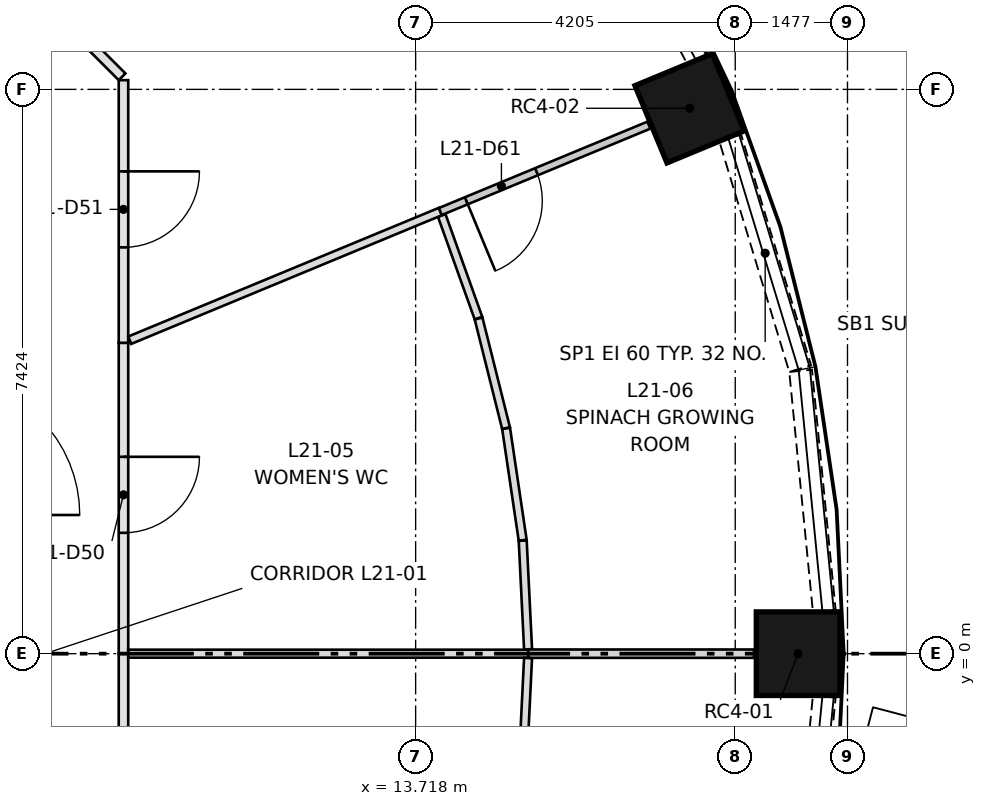
"""IFC4 building model, lengths in metres.
Left out: names, types, materials, properties, quantities, classifications, styles, units other than length and angle.
Written with IfcOpenShell. Run it as: python <this file> out.ifc"""

import sys

from ifc_helpers import new_model, si_unit, direction, frame, frame_2d, origin, origin_2d, place, context, subcontext, project, spatial, rectangle, extrude, element, fill, save


model = new_model("IFC4")
c1 = context("Model", 3, precision=1e-05, world=origin(), true_north=direction((0.0, 1.0)))
c2 = subcontext(c1, "Body", "Model", "MODEL_VIEW")
j1 = project(units=[si_unit("LENGTHUNIT", "METRE"), si_unit("PLANEANGLEUNIT", "RADIAN")], contexts=[c1])
p1 = place(None, origin())
s1 = spatial("IfcSite", under=j1, at=p1, CompositionType="ELEMENT")
p2 = place(p1, origin())
s2 = spatial("IfcBuilding", under=s1, at=p2, CompositionType="ELEMENT")
p3 = place(p2, frame((0.0, 0.0, 83.7)))
s3 = spatial("IfcBuildingStorey", under=s2, at=p3, CompositionType="ELEMENT", Elevation=83.7)
for number, where, z_axis, x_axis in (
    (1, (18.75, 0.0, 0.0), (0.0, 0.0, 1.0), (1.0, 0.0, 0.0)),
    (2, (17.323, 7.175, 0.0), (0.0, 0.0, 1.0), (0.924, 0.383, 0.0)),
):
    element("IfcColumn", number, at=place(p3, frame(where, z_axis=z_axis, x_axis=x_axis)), inside=s3, PredefinedType="COLUMN", context=c2, shape_type="SweptSolid", body=[
        extrude(rectangle(XDim=1.1, YDim=1.1, at=origin_2d()), origin(), (0.0, 0.0, 1.0), 3.65),
    ])
p4 = place(p3, frame((19.094, 0.564, 0.0), z_axis=(0.0, 0.0, 1.0), x_axis=(-0.098040704044, 0.995182405567, 0.0)))
e3 = element("IfcWall", 3, at=p4, inside=s3, PredefinedType="SOLIDWALL", context=c2, shape_type="SweptSolid", body=[
    extrude(rectangle(XDim=3.173, YDim=0.3, at=frame_2d((1.586, 0.0))), origin(), (0.0, 0.0, 1.0), 0.9),
])
p5 = place(p3, frame((18.778, 3.75, 0.0), z_axis=(0.0, 0.0, 1.0), x_axis=(-0.290325591482, 0.956927923582, 0.0)))
e4 = element("IfcWall", 4, at=p5, inside=s3, PredefinedType="SOLIDWALL", context=c2, shape_type="SweptSolid", body=[
    extrude(rectangle(XDim=3.173, YDim=0.3, at=frame_2d((1.586, 0.0))), origin(), (0.0, 0.0, 1.0), 0.9),
])
p6 = place(p3, frame((17.425, 7.828, 0.0), z_axis=(0.0, 0.0, 1.0), x_axis=(-0.471458802606, 0.88188808669, 0.0)))
e5 = element("IfcWall", 5, at=p6, inside=s3, PredefinedType="SOLIDWALL", context=c2, shape_type="SweptSolid", body=[
    extrude(rectangle(XDim=3.172, YDim=0.3, at=frame_2d((1.586, 0.0))), origin(), (0.0, 0.0, 1.0), 0.9),
])
p7 = place(p3, frame((18.783, -3.721, 0.0), z_axis=(0.0, 0.0, 1.0), x_axis=(0.098040704044, 0.995182405567, 0.0)))
e6 = element("IfcWall", 6, at=p7, inside=s3, PredefinedType="SOLIDWALL", context=c2, shape_type="SweptSolid", body=[
    extrude(rectangle(XDim=3.173, YDim=0.3, at=frame_2d((1.586, 0.0))), origin(), (0.0, 0.0, 1.0), 0.9),
])
p8 = place(p3, frame((9.874, 4.09, 0.0), z_axis=(0.0, 0.0, 1.0), x_axis=(0.0, -1.0, 0.0)))
e7 = element("IfcWall", 7, at=p8, inside=s3, PredefinedType="PARTITIONING", context=c2, shape_type="SweptSolid", body=[
    extrude(rectangle(XDim=4.09, YDim=0.125, at=frame_2d((2.045, 0.0))), origin(), (0.0, 0.0, 1.0), 3.3),
])
p9 = place(p8, frame((1.5, 0.0, 0.0)))
e8 = element("IfcOpeningElement", 8, at=p9, cuts=e7, PredefinedType="OPENING", context=c2, shape_type="SweptSolid", body=[
    extrude(rectangle(XDim=1.0, YDim=2.1, at=frame_2d((0.5, 1.05))), frame((0.0, 0.073, 0.0), z_axis=(0.0, -1.0, 0.0), x_axis=(1.0, 0.0, 0.0)), (0.0, 0.0, 1.0), 0.145),
])
p10 = place(p3, frame((8.722, 8.722, 0.0), z_axis=(0.0, 0.0, 1.0), x_axis=(0.70718294931, -0.707030604857, 0.0)))
e9 = element("IfcWall", 9, at=p10, inside=s3, PredefinedType="PARTITIONING", context=c2, shape_type="SweptSolid", body=[
    extrude(rectangle(XDim=1.603, YDim=0.125, at=frame_2d((0.801, 0.0))), origin(), (0.0, 0.0, 1.0), 3.3),
])
p11 = place(p3, frame((9.874, 7.545, 0.0), z_axis=(0.0, 0.0, 1.0), x_axis=(0.0, -1.0, 0.0)))
e10 = element("IfcWall", 10, at=p11, inside=s3, PredefinedType="PARTITIONING", context=c2, shape_type="SweptSolid", body=[
    extrude(rectangle(XDim=3.455, YDim=0.125, at=frame_2d((1.728, 0.0))), origin(), (0.0, 0.0, 1.0), 3.3),
])
p12 = place(p11, frame((1.2, 0.0, 0.0)))
e11 = element("IfcOpeningElement", 11, at=p12, cuts=e10, PredefinedType="OPENING", context=c2, shape_type="SweptSolid", body=[
    extrude(rectangle(XDim=1.0, YDim=2.1, at=frame_2d((0.5, 1.05))), frame((0.0, 0.073, 0.0), z_axis=(0.0, -1.0, 0.0), x_axis=(1.0, 0.0, 0.0)), (0.0, 0.0, 1.0), 0.145),
])
p13 = place(p3, frame((9.874, 0.0, 0.0), z_axis=(0.0, 0.0, 1.0), x_axis=(0.0, -1.0, 0.0)))
e12 = element("IfcWall", 12, at=p13, inside=s3, PredefinedType="PARTITIONING", context=c2, shape_type="SweptSolid", body=[
    extrude(rectangle(XDim=4.09, YDim=0.125, at=frame_2d((2.045, 0.0))), origin(), (0.0, 0.0, 1.0), 3.3),
])
p14 = place(p13, frame((1.5, 0.0, 0.0)))
e13 = element("IfcOpeningElement", 13, at=p14, cuts=e12, PredefinedType="OPENING", context=c2, shape_type="SweptSolid", body=[
    extrude(rectangle(XDim=1.0, YDim=2.1, at=frame_2d((0.5, 1.05))), frame((0.0, 0.073, 0.0), z_axis=(0.0, -1.0, 0.0), x_axis=(1.0, 0.0, 0.0)), (0.0, 0.0, 1.0), 0.145),
])
p15 = place(p3, frame((14.062, 5.765, 0.0), z_axis=(0.0, 0.0, 1.0), x_axis=(0.336940319535, -0.941526006583, 0.0)))
e14 = element("IfcWall", 14, at=p15, inside=s3, PredefinedType="PARTITIONING", context=c2, shape_type="SweptSolid", body=[
    extrude(rectangle(XDim=1.434, YDim=0.105, at=frame_2d((0.717, 0.0))), origin(), (0.0, 0.0, 1.0), 3.3),
])
p16 = place(p3, frame((14.546, 4.41, 0.0), z_axis=(0.0, 0.0, 1.0), x_axis=(0.242922070527, -0.970045806986, 0.0)))
e15 = element("IfcWall", 15, at=p16, inside=s3, PredefinedType="PARTITIONING", context=c2, shape_type="SweptSolid", body=[
    extrude(rectangle(XDim=1.486, YDim=0.105, at=frame_2d((0.743, 0.0))), origin(), (0.0, 0.0, 1.0), 3.3),
])
p17 = place(p3, frame((14.908, 2.963, 0.0), z_axis=(0.0, 0.0, 1.0), x_axis=(0.146822447166, -0.989162862732, 0.0)))
e16 = element("IfcWall", 16, at=p17, inside=s3, PredefinedType="PARTITIONING", context=c2, shape_type="SweptSolid", body=[
    extrude(rectangle(XDim=1.487, YDim=0.105, at=frame_2d((0.743, 0.0))), origin(), (0.0, 0.0, 1.0), 3.3),
])
p18 = place(p3, frame((15.127, 1.487, 0.0), z_axis=(0.0, 0.0, 1.0), x_axis=(0.0491209592, -0.998792837062, 0.0)))
e17 = element("IfcWall", 17, at=p18, inside=s3, PredefinedType="PARTITIONING", context=c2, shape_type="SweptSolid", body=[
    extrude(rectangle(XDim=1.431, YDim=0.105, at=frame_2d((0.716, 0.0))), origin(), (0.0, 0.0, 1.0), 3.3),
])
p19 = place(p3, frame((9.957, 4.124, 0.0), z_axis=(0.0, 0.0, 1.0), x_axis=(0.923862097388, 0.382725521764, 0.0)))
e18 = element("IfcWall", 18, at=p19, inside=s3, PredefinedType="PARTITIONING", context=c2, shape_type="SweptSolid", body=[
    extrude(rectangle(XDim=4.423, YDim=0.105, at=frame_2d((2.211, 0.0))), origin(), (0.0, 0.0, 1.0), 3.3),
])
p20 = place(p3, frame((15.2, 0.0, 0.0), z_axis=(0.0, 0.0, 1.0), x_axis=(-1.0, 0.0, 0.0)))
e19 = element("IfcWall", 19, at=p20, inside=s3, PredefinedType="PARTITIONING", context=c2, shape_type="SweptSolid", body=[
    extrude(rectangle(XDim=5.263, YDim=0.105, at=frame_2d((2.632, 0.0))), origin(), (0.0, 0.0, 1.0), 3.3),
])
p21 = place(p3, frame((16.787, 6.953, 0.0), z_axis=(0.0, 0.0, 1.0), x_axis=(-0.923889594764, -0.382659139036, 0.0)))
e20 = element("IfcWall", 20, at=p21, inside=s3, PredefinedType="PARTITIONING", context=c2, shape_type="SweptSolid", body=[
    extrude(rectangle(XDim=2.97, YDim=0.1, at=frame_2d((1.485, 0.0))), origin(), (0.0, 0.0, 1.0), 3.3),
])
p22 = place(p21, frame((1.6, 0.0, 0.0)))
e21 = element("IfcOpeningElement", 21, at=p22, cuts=e20, PredefinedType="OPENING", context=c2, shape_type="SweptSolid", body=[
    extrude(rectangle(XDim=1.0, YDim=2.1, at=frame_2d((0.5, 1.05))), frame((0.0, 0.06, 0.0), z_axis=(0.0, -1.0, 0.0), x_axis=(1.0, 0.0, 0.0)), (0.0, 0.0, 1.0), 0.12),
])
p23 = place(p3, frame((18.17, 0.0, 0.0), z_axis=(0.0, 0.0, 1.0), x_axis=(-1.0, 0.0, 0.0)))
e22 = element("IfcWall", 22, at=p23, inside=s3, PredefinedType="PARTITIONING", context=c2, shape_type="SweptSolid", body=[
    extrude(rectangle(XDim=2.97, YDim=0.11, at=frame_2d((1.485, 0.0))), origin(), (0.0, 0.0, 1.0), 3.3),
])
p24 = place(p3, frame((15.127, -1.487, 0.0), z_axis=(0.0, 0.0, 1.0), x_axis=(0.0491209592, 0.998792837062, 0.0)))
e23 = element("IfcWall", 23, at=p24, inside=s3, PredefinedType="PARTITIONING", context=c2, shape_type="SweptSolid", body=[
    extrude(rectangle(XDim=1.431, YDim=0.105, at=frame_2d((0.716, 0.0))), origin(), (0.0, 0.0, 1.0), 3.3),
])
p25 = place(p9, origin())
e24 = element("IfcDoor", 24, at=p25, inside=s3, OperationType="SINGLE_SWING_LEFT", PredefinedType="DOOR", context=c2, shape_type="SweptSolid", body=[
    extrude(rectangle(XDim=1.0, YDim=2.1, at=frame_2d((0.5, 1.05))), frame((0.0, 0.025, 0.0), z_axis=(0.0, -1.0, 0.0), x_axis=(1.0, 0.0, 0.0)), (0.0, 0.0, 1.0), 0.05),
])
fill(e8, e24)
p26 = place(p12, origin())
e25 = element("IfcDoor", 25, at=p26, inside=s3, OperationType="SINGLE_SWING_LEFT", PredefinedType="DOOR", context=c2, shape_type="SweptSolid", body=[
    extrude(rectangle(XDim=1.0, YDim=2.1, at=frame_2d((0.5, 1.05))), frame((0.0, 0.025, 0.0), z_axis=(0.0, -1.0, 0.0), x_axis=(1.0, 0.0, 0.0)), (0.0, 0.0, 1.0), 0.05),
])
fill(e11, e25)
p27 = place(p22, origin())
e26 = element("IfcDoor", 26, at=p27, inside=s3, OperationType="SINGLE_SWING_RIGHT", PredefinedType="DOOR", context=c2, shape_type="SweptSolid", body=[
    extrude(rectangle(XDim=1.0, YDim=2.1, at=frame_2d((0.5, 1.05))), frame((0.0, 0.025, 0.0), z_axis=(0.0, -1.0, 0.0), x_axis=(1.0, 0.0, 0.0)), (0.0, 0.0, 1.0), 0.05),
])
fill(e21, e26)
save(model, sys.argv[1])
